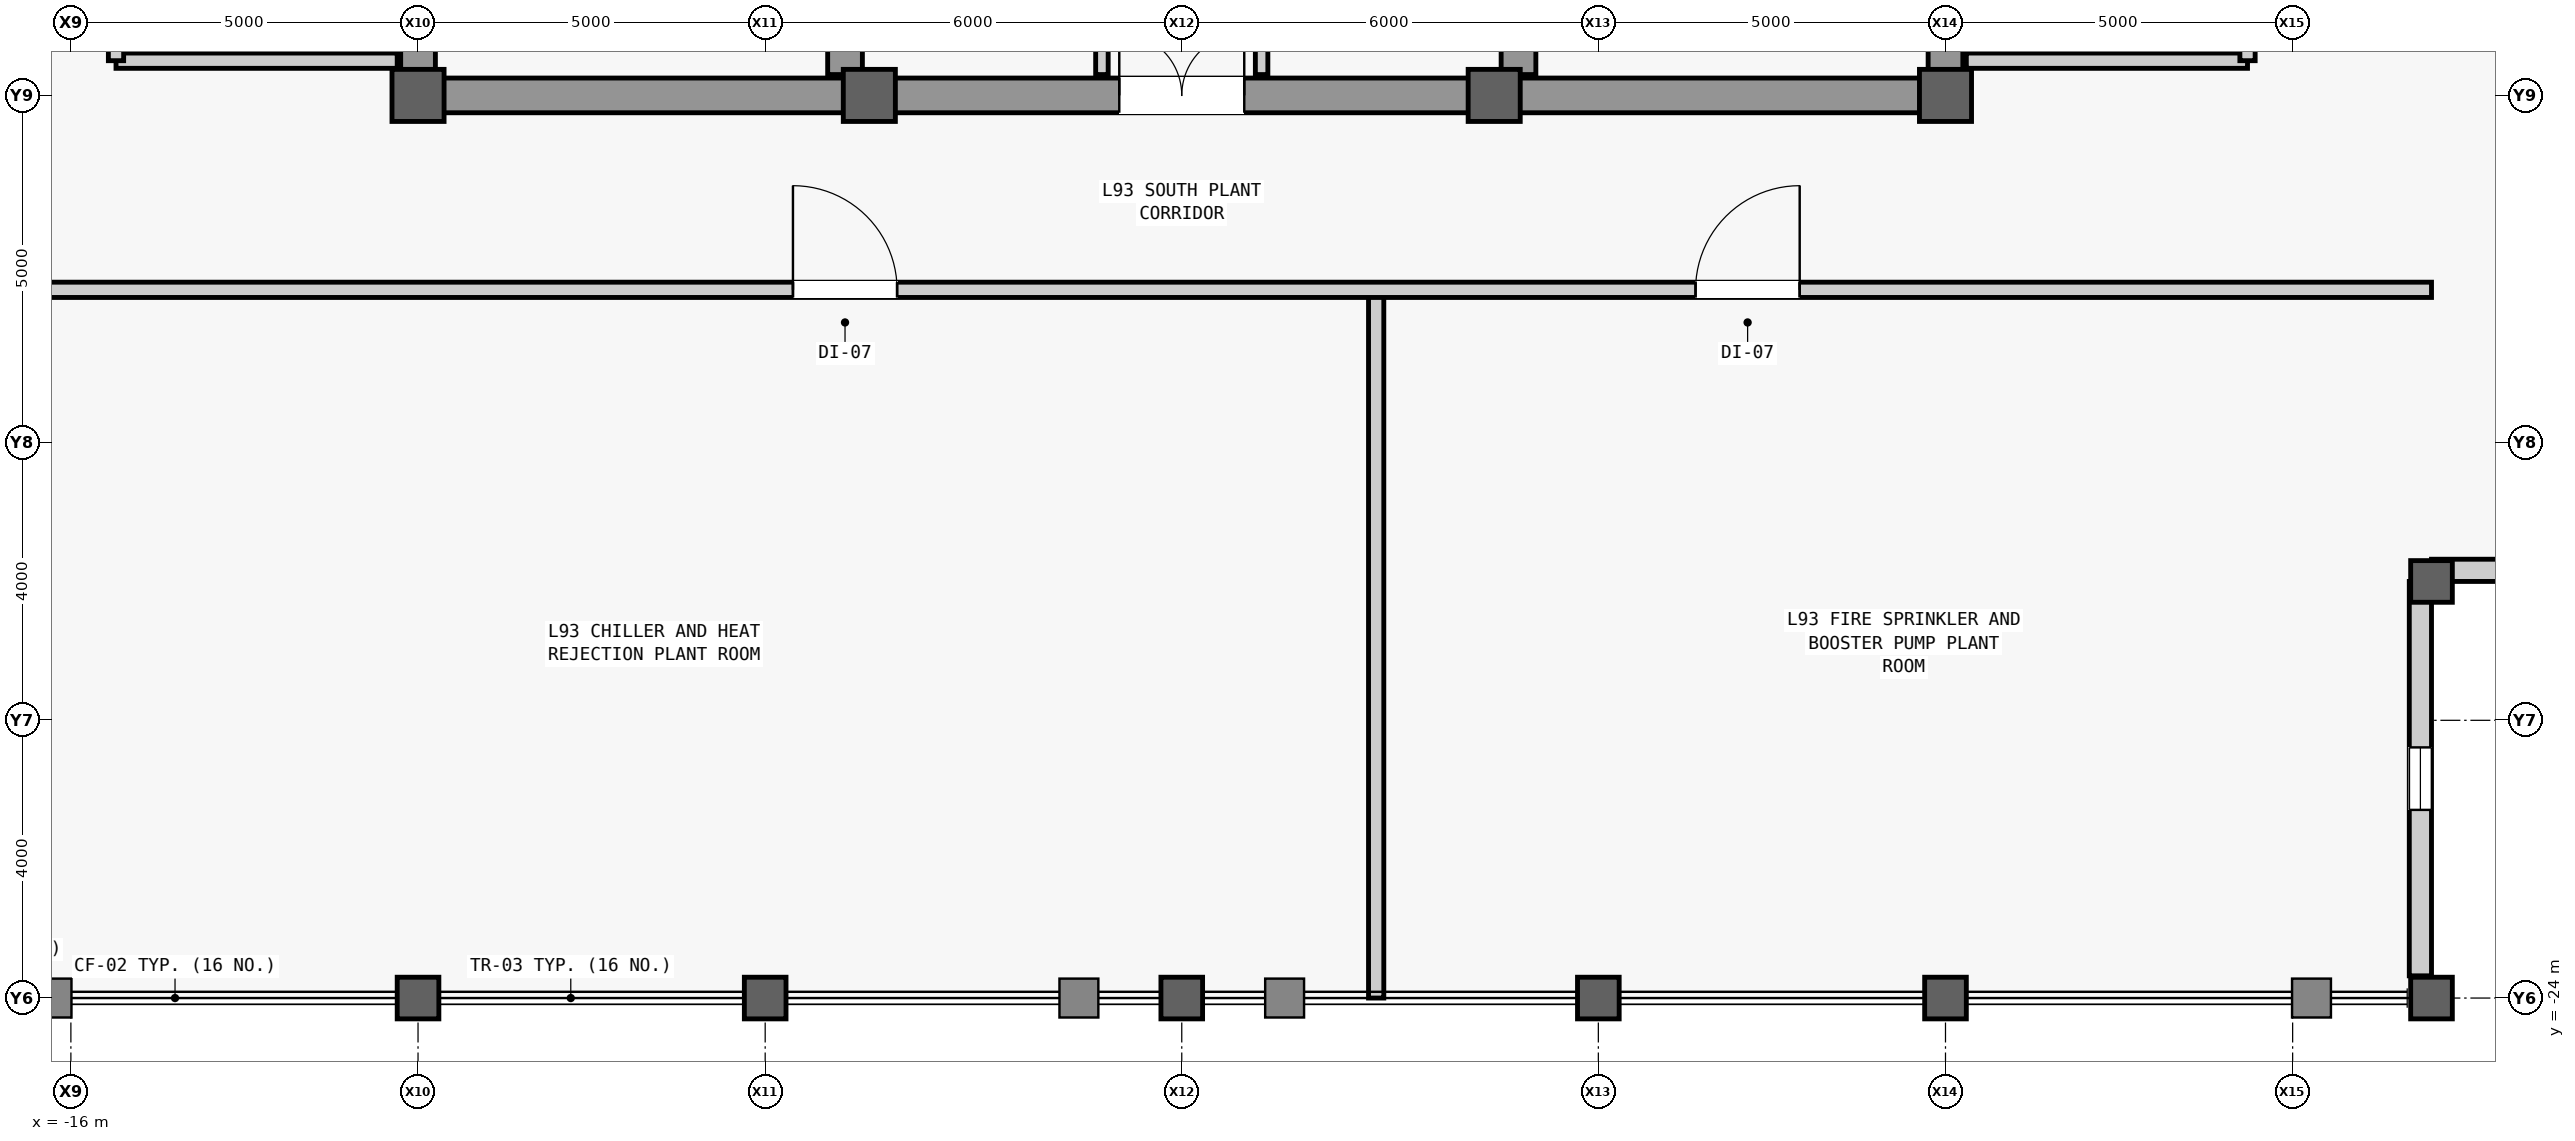
"""IFC4 building model, lengths in metres.
Left out: names, types, materials, properties, quantities, classifications, styles, units other than length and angle.
Written with IfcOpenShell. Run it as: python <this file> out.ifc"""

import sys

from ifc_helpers import new_model, si_unit, direction, frame, frame_2d, origin, origin_2d, place, context, subcontext, project, spatial, rectangle, hollow_rectangle, extrude, source, transform, mapped, element, fill, save


model = new_model("IFC4")
c1 = context("Model", 3, precision=1e-05, world=origin(), true_north=direction((0.0, 1.0)))
c2 = subcontext(c1, "Body", "Model", "MODEL_VIEW")
j1 = project(units=[si_unit("LENGTHUNIT", "METRE"), si_unit("PLANEANGLEUNIT", "RADIAN")], contexts=[c1])
p1 = place(None, origin())
s1 = spatial("IfcSite", under=j1, at=p1, CompositionType="ELEMENT")
p2 = place(p1, origin())
s2 = spatial("IfcBuilding", under=s1, at=p2, CompositionType="ELEMENT")
p3 = place(p2, frame((0.0, 0.0, 394.7)))
s3 = spatial("IfcBuildingStorey", under=s2, at=p3, CompositionType="ELEMENT", Elevation=394.7)
m1 = source(origin(), c2, "Body", "SweptSolid", [
    extrude(rectangle(XDim=22.0, YDim=0.5, at=frame_2d((11.0, 0.0))), origin(), (0.0, 0.0, 1.0), 4.45),
])
p4 = place(p3, frame((-11.0, -11.0, 0.0), z_axis=(0.0, 0.0, 1.0), x_axis=(0.0, 1.0, 0.0)))
e1 = element("IfcWall", 1, at=p4, inside=s3, PredefinedType="SHEAR", context=c2, shape_type="MappedRepresentation", body=[
    mapped(m1, transform((0.0, 0.0, 0.0), scale=1.0)),
])
m2 = source(origin(), c2, "Body", "SweptSolid", [
    extrude(rectangle(XDim=1.1, YDim=2.2, at=frame_2d((0.55, 1.1))), frame((0.0, 0.26, 0.0), z_axis=(0.0, -1.0, 0.0), x_axis=(1.0, 0.0, 0.0)), (0.0, 0.0, 1.0), 0.52),
])
p5 = place(p4, frame((0.8, 0.0, 0.0)))
e2 = element("IfcOpeningElement", 2, at=p5, cuts=e1, PredefinedType="OPENING", context=c2, shape_type="MappedRepresentation", body=[
    mapped(m2, transform((0.0, 0.0, 0.0), scale=1.0)),
])
p6 = place(p4, frame((12.5, 0.0, 0.0)))
e3 = element("IfcOpeningElement", 3, at=p6, cuts=e1, PredefinedType="OPENING", context=c2, shape_type="MappedRepresentation", body=[
    mapped(m2, transform((0.0, 0.0, 0.0), scale=1.0)),
])
m3 = source(origin(), c2, "Body", "SweptSolid", [
    extrude(rectangle(XDim=0.9, YDim=2.15, at=frame_2d((0.45, 1.075))), frame((0.0, 0.26, 0.0), z_axis=(0.0, -1.0, 0.0), x_axis=(1.0, 0.0, 0.0)), (0.0, 0.0, 1.0), 0.52),
])
p7 = place(p4, frame((7.575, 0.0, 0.0)))
e4 = element("IfcOpeningElement", 4, at=p7, cuts=e1, PredefinedType="OPENING", context=c2, shape_type="MappedRepresentation", body=[
    mapped(m3, transform((0.0, 0.0, 0.0), scale=1.0)),
])
m4 = source(origin(), c2, "Body", "SweptSolid", [
    extrude(rectangle(XDim=1.3, YDim=2.3, at=frame_2d((0.65, 1.15))), frame((0.0, 0.26, 0.0), z_axis=(0.0, -1.0, 0.0), x_axis=(1.0, 0.0, 0.0)), (0.0, 0.0, 1.0), 0.52),
])
p8 = place(p4, frame((2.7, 0.0, 0.0)))
e5 = element("IfcOpeningElement", 5, at=p8, cuts=e1, PredefinedType="OPENING", context=c2, shape_type="MappedRepresentation", body=[
    mapped(m4, transform((0.0, 0.0, 0.0), scale=1.0)),
])
p9 = place(p3, frame((11.0, -11.0, 0.0), z_axis=(0.0, 0.0, 1.0), x_axis=(0.0, 1.0, 0.0)))
e6 = element("IfcWall", 6, at=p9, inside=s3, PredefinedType="SHEAR", context=c2, shape_type="MappedRepresentation", body=[
    mapped(m1, transform((0.0, 0.0, 0.0), scale=1.0)),
])
p10 = place(p9, frame((0.8, 0.0, 0.0)))
e7 = element("IfcOpeningElement", 7, at=p10, cuts=e6, PredefinedType="OPENING", context=c2, shape_type="MappedRepresentation", body=[
    mapped(m2, transform((0.0, 0.0, 0.0), scale=1.0)),
])
p11 = place(p9, frame((7.575, 0.0, 0.0)))
e8 = element("IfcOpeningElement", 8, at=p11, cuts=e6, PredefinedType="OPENING", context=c2, shape_type="MappedRepresentation", body=[
    mapped(m3, transform((0.0, 0.0, 0.0), scale=1.0)),
])
p12 = place(p9, frame((2.7, 0.0, 0.0)))
e9 = element("IfcOpeningElement", 9, at=p12, cuts=e6, PredefinedType="OPENING", context=c2, shape_type="MappedRepresentation", body=[
    mapped(m4, transform((0.0, 0.0, 0.0), scale=1.0)),
])
p13 = place(p9, frame((13.35, 0.0, 0.0)))
e10 = element("IfcOpeningElement", 10, at=p13, cuts=e6, PredefinedType="OPENING", context=c2, shape_type="MappedRepresentation", body=[
    mapped(m4, transform((0.0, 0.0, 0.0), scale=1.0)),
])
m5 = source(origin(), c2, "Body", "SweptSolid", [
    extrude(rectangle(XDim=21.4, YDim=0.5, at=frame_2d((10.7, 0.0))), origin(), (0.0, 0.0, 1.0), 4.45),
])
for number, where, z_axis, x_axis in (
    (11, (-4.85, -10.7, 0.0), (0.0, 0.0, 1.0), (0.0, 1.0, 0.0)),
    (12, (4.85, -10.7, 0.0), (0.0, 0.0, 1.0), (0.0, 1.0, 0.0)),
):
    element("IfcWall", number, at=place(p3, frame(where, z_axis=z_axis, x_axis=x_axis)), inside=s3, PredefinedType="SHEAR", context=c2, shape_type="MappedRepresentation", body=[
        mapped(m5, transform((0.0, 0.0, 0.0), scale=1.0)),
    ])
m6 = source(origin(), c2, "Body", "SweptSolid", [
    extrude(rectangle(XDim=5.9, YDim=0.5, at=frame_2d((2.95, 0.0))), origin(), (0.0, 0.0, 1.0), 4.45),
])
for number, where, z_axis, x_axis in (
    (13, (-10.75, -11.0, 0.0), (0.0, 0.0, 1.0), (1.0, 0.0, 0.0)),
    (14, (4.85, -11.0, 0.0), (0.0, 0.0, 1.0), (1.0, 0.0, 0.0)),
):
    element("IfcWall", number, at=place(p3, frame(where, z_axis=z_axis, x_axis=x_axis)), inside=s3, PredefinedType="SHEAR", context=c2, shape_type="MappedRepresentation", body=[
        mapped(m6, transform((0.0, 0.0, 0.0), scale=1.0)),
    ])
m7 = source(origin(), c2, "Body", "SweptSolid", [
    extrude(rectangle(XDim=9.2, YDim=0.5, at=frame_2d((4.6, 0.0))), origin(), (0.0, 0.0, 1.0), 4.45),
])
p14 = place(p3, frame((-4.6, -11.0, 0.0), z_axis=(0.0, 0.0, 1.0), x_axis=(1.0, 0.0, 0.0)))
e15 = element("IfcWall", 15, at=p14, inside=s3, PredefinedType="SHEAR", context=c2, shape_type="MappedRepresentation", body=[
    mapped(m7, transform((0.0, 0.0, 0.0), scale=1.0)),
])
m8 = source(origin(), c2, "Body", "SweptSolid", [
    extrude(rectangle(XDim=1.8, YDim=2.25, at=frame_2d((0.9, 1.125))), frame((0.0, 0.26, 0.0), z_axis=(0.0, -1.0, 0.0), x_axis=(1.0, 0.0, 0.0)), (0.0, 0.0, 1.0), 0.52),
])
p15 = place(p14, frame((3.7, 0.0, 0.0)))
e16 = element("IfcOpeningElement", 16, at=p15, cuts=e15, PredefinedType="OPENING", context=c2, shape_type="MappedRepresentation", body=[
    mapped(m8, transform((0.0, 0.0, 0.0), scale=1.0)),
])
m9 = source(origin(), c2, "Body", "SweptSolid", [
    extrude(hollow_rectangle(XDim=0.6, YDim=0.6, WallThickness=0.035, at=origin_2d()), origin(), (0.0, 0.0, 1.0), 4.8),
])
p16 = place(p3, frame((-11.0, -24.0, 0.0), z_axis=(0.0, 0.0, 1.0), x_axis=(1.0, 0.0, 0.0)))
e17 = element("IfcColumn", 17, at=p16, inside=s3, PredefinedType="COLUMN", context=c2, shape_type="MappedRepresentation", body=[
    mapped(m9, transform((0.0, 0.0, 0.0), scale=1.0)),
])
m10 = source(origin(), c2, "Body", "SweptSolid", [
    extrude(rectangle(XDim=0.75, YDim=0.75, at=origin_2d()), origin(), (0.0, 0.0, 1.0), 4.8),
])
p17 = place(p3, frame((-11.0, -11.0, 0.0), z_axis=(0.0, 0.0, 1.0), x_axis=(1.0, 0.0, 0.0)))
e18 = element("IfcColumn", 18, at=p17, inside=s3, PredefinedType="COLUMN", context=c2, shape_type="MappedRepresentation", body=[
    mapped(m10, transform((0.0, 0.0, 0.0), scale=1.0)),
])
p18 = place(p3, frame((-6.0, -24.0, 0.0), z_axis=(0.0, 0.0, 1.0), x_axis=(1.0, 0.0, 0.0)))
e19 = element("IfcColumn", 19, at=p18, inside=s3, PredefinedType="COLUMN", context=c2, shape_type="MappedRepresentation", body=[
    mapped(m9, transform((0.0, 0.0, 0.0), scale=1.0)),
])
p19 = place(p3, frame((-4.5, -11.0, 0.0), z_axis=(0.0, 0.0, 1.0), x_axis=(1.0, 0.0, 0.0)))
e20 = element("IfcColumn", 20, at=p19, inside=s3, PredefinedType="COLUMN", context=c2, shape_type="MappedRepresentation", body=[
    mapped(m10, transform((0.0, 0.0, 0.0), scale=1.0)),
])
p20 = place(p3, frame((0.0, -24.0, 0.0), z_axis=(0.0, 0.0, 1.0), x_axis=(1.0, 0.0, 0.0)))
e21 = element("IfcColumn", 21, at=p20, inside=s3, PredefinedType="COLUMN", context=c2, shape_type="MappedRepresentation", body=[
    mapped(m9, transform((0.0, 0.0, 0.0), scale=1.0)),
])
p21 = place(p3, frame((4.5, -11.0, 0.0), z_axis=(0.0, 0.0, 1.0), x_axis=(1.0, 0.0, 0.0)))
e22 = element("IfcColumn", 22, at=p21, inside=s3, PredefinedType="COLUMN", context=c2, shape_type="MappedRepresentation", body=[
    mapped(m10, transform((0.0, 0.0, 0.0), scale=1.0)),
])
for number, where, z_axis, x_axis in (
    (23, (6.0, -24.0, 0.0), (0.0, 0.0, 1.0), (1.0, 0.0, 0.0)),
    (24, (11.0, -24.0, 0.0), (0.0, 0.0, 1.0), (1.0, 0.0, 0.0)),
):
    element("IfcColumn", number, at=place(p3, frame(where, z_axis=z_axis, x_axis=x_axis)), inside=s3, PredefinedType="COLUMN", context=c2, shape_type="MappedRepresentation", body=[
        mapped(m9, transform((0.0, 0.0, 0.0), scale=1.0)),
    ])
p22 = place(p3, frame((11.0, -11.0, 0.0), z_axis=(0.0, 0.0, 1.0), x_axis=(1.0, 0.0, 0.0)))
e25 = element("IfcColumn", 25, at=p22, inside=s3, PredefinedType="COLUMN", context=c2, shape_type="MappedRepresentation", body=[
    mapped(m10, transform((0.0, 0.0, 0.0), scale=1.0)),
])
for number, where, z_axis, x_axis in (
    (26, (18.0, -24.0, 0.0), (0.0, 0.0, 1.0), (1.0, 0.0, 0.0)),
    (27, (18.0, -18.0, 0.0), (0.0, 0.0, 1.0), (1.0, 0.0, 0.0)),
):
    element("IfcColumn", number, at=place(p3, frame(where, z_axis=z_axis, x_axis=x_axis)), inside=s3, PredefinedType="COLUMN", context=c2, shape_type="MappedRepresentation", body=[
        mapped(m9, transform((0.0, 0.0, 0.0), scale=1.0)),
    ])
m11 = source(origin(), c2, "Body", "SweptSolid", [
    extrude(rectangle(XDim=5.68, YDim=0.32, at=frame_2d((2.84, 0.0))), origin(), (0.0, 0.0, 1.0), 3.901),
])
p23 = place(p3, frame((17.84, -23.68, 0.0), z_axis=(0.0, 0.0, 1.0), x_axis=(0.0, 1.0, 0.0)))
e28 = element("IfcWall", 28, at=p23, inside=s3, PredefinedType="STANDARD", context=c2, shape_type="MappedRepresentation", body=[
    mapped(m11, transform((0.0, 0.0, 0.0), scale=1.0)),
])
m12 = source(origin(), c2, "Body", "SweptSolid", [
    extrude(rectangle(XDim=0.9, YDim=2.4, at=frame_2d((0.45, 1.2))), frame((0.0, 0.17, 0.0), z_axis=(0.0, -1.0, 0.0), x_axis=(1.0, 0.0, 0.0)), (0.0, 0.0, 1.0), 0.34),
])
p24 = place(p23, frame((2.39, 0.0, 0.7)))
e29 = element("IfcOpeningElement", 29, at=p24, cuts=e28, PredefinedType="OPENING", context=c2, shape_type="MappedRepresentation", body=[
    mapped(m12, transform((0.0, 0.0, 0.0), scale=1.0)),
])
p25 = place(p3, frame((18.0, -17.84, 0.0), z_axis=(0.0, 0.0, 1.0), x_axis=(1.0, 0.0, 0.0)))
e30 = element("IfcWall", 30, at=p25, inside=s3, PredefinedType="STANDARD", context=c2, shape_type="MappedRepresentation", body=[
    mapped(m11, transform((0.0, 0.0, 0.0), scale=1.0)),
])
p26 = place(p25, frame((2.39, 0.0, 0.7)))
e31 = element("IfcOpeningElement", 31, at=p26, cuts=e30, PredefinedType="OPENING", context=c2, shape_type="MappedRepresentation", body=[
    mapped(m12, transform((0.0, 0.0, 0.0), scale=1.0)),
])
m13 = source(origin(), c2, "Body", "SweptSolid", [
    extrude(rectangle(XDim=4.05, YDim=0.22, at=frame_2d((2.025, 0.0))), origin(), (0.0, 0.0, 1.0), 4.45),
])
p27 = place(p3, frame((-15.35, -10.5, 0.0), z_axis=(0.0, 0.0, 1.0), x_axis=(1.0, 0.0, 0.0)))
e32 = element("IfcWall", 32, at=p27, inside=s3, PredefinedType="PARTITIONING", context=c2, shape_type="MappedRepresentation", body=[
    mapped(m13, transform((0.0, 0.0, 0.0), scale=1.0)),
])
m14 = source(origin(), c2, "Body", "SweptSolid", [
    extrude(rectangle(XDim=4.4, YDim=0.22, at=frame_2d((2.2, 0.0))), origin(), (0.0, 0.0, 1.0), 4.45),
])
p28 = place(p3, frame((-15.35, -10.5, 0.0), z_axis=(0.0, 0.0, 1.0), x_axis=(0.0, 1.0, 0.0)))
e33 = element("IfcWall", 33, at=p28, inside=s3, PredefinedType="PARTITIONING", context=c2, shape_type="MappedRepresentation", body=[
    mapped(m14, transform((0.0, 0.0, 0.0), scale=1.0)),
])
m15 = source(origin(), c2, "Body", "SweptSolid", [
    extrude(rectangle(XDim=1.2, YDim=2.2, at=frame_2d((0.6, 1.1))), frame((0.0, 0.12, 0.0), z_axis=(0.0, -1.0, 0.0), x_axis=(1.0, 0.0, 0.0)), (0.0, 0.0, 1.0), 0.24),
])
p29 = place(p28, frame((1.6, 0.0, 0.0)))
e34 = element("IfcOpeningElement", 34, at=p29, cuts=e33, PredefinedType="OPENING", context=c2, shape_type="MappedRepresentation", body=[
    mapped(m15, transform((0.0, 0.0, 0.0), scale=1.0)),
])
p30 = place(p3, frame((11.3, -10.5, 0.0), z_axis=(0.0, 0.0, 1.0), x_axis=(1.0, 0.0, 0.0)))
e35 = element("IfcWall", 35, at=p30, inside=s3, PredefinedType="PARTITIONING", context=c2, shape_type="MappedRepresentation", body=[
    mapped(m13, transform((0.0, 0.0, 0.0), scale=1.0)),
])
p31 = place(p3, frame((15.35, -10.5, 0.0), z_axis=(0.0, 0.0, 1.0), x_axis=(0.0, 1.0, 0.0)))
e36 = element("IfcWall", 36, at=p31, inside=s3, PredefinedType="PARTITIONING", context=c2, shape_type="MappedRepresentation", body=[
    mapped(m14, transform((0.0, 0.0, 0.0), scale=1.0)),
])
p32 = place(p31, frame((1.6, 0.0, 0.0)))
e37 = element("IfcOpeningElement", 37, at=p32, cuts=e36, PredefinedType="OPENING", context=c2, shape_type="MappedRepresentation", body=[
    mapped(m15, transform((0.0, 0.0, 0.0), scale=1.0)),
])
m16 = source(origin(), c2, "Body", "SweptSolid", [
    extrude(rectangle(XDim=5.4, YDim=0.18, at=frame_2d((2.7, 0.0))), origin(), (0.0, 0.0, 1.0), 4.45),
])
p33 = place(p3, frame((-1.15, -10.7, 0.0), z_axis=(0.0, 0.0, 1.0), x_axis=(0.0, 1.0, 0.0)))
e38 = element("IfcWall", 38, at=p33, inside=s3, PredefinedType="PARTITIONING", context=c2, shape_type="MappedRepresentation", body=[
    mapped(m16, transform((0.0, 0.0, 0.0), scale=1.0)),
])
m17 = source(origin(), c2, "Body", "SweptSolid", [
    extrude(rectangle(XDim=0.9, YDim=2.15, at=frame_2d((0.45, 1.075))), frame((0.0, 0.1, 0.0), z_axis=(0.0, -1.0, 0.0), x_axis=(1.0, 0.0, 0.0)), (0.0, 0.0, 1.0), 0.2),
])
p34 = place(p33, frame((1.15, 0.0, 0.0)))
e39 = element("IfcOpeningElement", 39, at=p34, cuts=e38, PredefinedType="OPENING", context=c2, shape_type="MappedRepresentation", body=[
    mapped(m17, transform((0.0, 0.0, 0.0), scale=1.0)),
])
p35 = place(p33, frame((3.85, 0.0, 0.0)))
e40 = element("IfcOpeningElement", 40, at=p35, cuts=e38, PredefinedType="OPENING", context=c2, shape_type="MappedRepresentation", body=[
    mapped(m17, transform((0.0, 0.0, 0.0), scale=1.0)),
])
p36 = place(p3, frame((1.15, -10.7, 0.0), z_axis=(0.0, 0.0, 1.0), x_axis=(0.0, 1.0, 0.0)))
e41 = element("IfcWall", 41, at=p36, inside=s3, PredefinedType="PARTITIONING", context=c2, shape_type="MappedRepresentation", body=[
    mapped(m16, transform((0.0, 0.0, 0.0), scale=1.0)),
])
p37 = place(p36, frame((2.25, 0.0, 0.0)))
e42 = element("IfcOpeningElement", 42, at=p37, cuts=e41, PredefinedType="OPENING", context=c2, shape_type="MappedRepresentation", body=[
    mapped(m17, transform((0.0, 0.0, 0.0), scale=1.0)),
])
m18 = source(origin(), c2, "Body", "SweptSolid", [
    extrude(rectangle(XDim=10.2, YDim=0.22, at=frame_2d((5.1, 0.0))), origin(), (0.0, 0.0, 1.0), 4.45),
])
p38 = place(p3, frame((2.8, -24.0, 0.0), z_axis=(0.0, 0.0, 1.0), x_axis=(0.0, 1.0, 0.0)))
e43 = element("IfcWall", 43, at=p38, inside=s3, PredefinedType="PARTITIONING", context=c2, shape_type="MappedRepresentation", body=[
    mapped(m18, transform((0.0, 0.0, 0.0), scale=1.0)),
])
m19 = source(origin(), c2, "Body", "SweptSolid", [
    extrude(rectangle(XDim=36.0, YDim=0.22, at=frame_2d((18.0, 0.0))), origin(), (0.0, 0.0, 1.0), 4.45),
])
p39 = place(p3, frame((-18.0, -13.8, 0.0), z_axis=(0.0, 0.0, 1.0), x_axis=(1.0, 0.0, 0.0)))
e44 = element("IfcWall", 44, at=p39, inside=s3, PredefinedType="PARTITIONING", context=c2, shape_type="MappedRepresentation", body=[
    mapped(m19, transform((0.0, 0.0, 0.0), scale=1.0)),
])
m20 = source(origin(), c2, "Body", "SweptSolid", [
    extrude(rectangle(XDim=1.5, YDim=2.3, at=frame_2d((0.75, 1.15))), frame((0.0, 0.12, 0.0), z_axis=(0.0, -1.0, 0.0), x_axis=(1.0, 0.0, 0.0)), (0.0, 0.0, 1.0), 0.24),
])
p40 = place(p39, frame((12.4, 0.0, 0.0)))
e45 = element("IfcOpeningElement", 45, at=p40, cuts=e44, PredefinedType="OPENING", context=c2, shape_type="MappedRepresentation", body=[
    mapped(m20, transform((0.0, 0.0, 0.0), scale=1.0)),
])
p41 = place(p39, frame((25.4, 0.0, 0.0)))
e46 = element("IfcOpeningElement", 46, at=p41, cuts=e44, PredefinedType="OPENING", context=c2, shape_type="MappedRepresentation", body=[
    mapped(m20, transform((0.0, 0.0, 0.0), scale=1.0)),
])
m21 = source(origin(), c2, "Body", "SweptSolid", [
    extrude(rectangle(XDim=0.9, YDim=2.4, at=frame_2d((0.45, 1.2))), frame((0.0, 0.03, 0.0), z_axis=(0.0, -1.0, 0.0), x_axis=(1.0, 0.0, 0.0)), (0.0, 0.0, 1.0), 0.06),
])
p42 = place(p24, origin())
e47 = element("IfcWindow", 47, at=p42, inside=s3, PartitioningType="SINGLE_PANEL", PredefinedType="WINDOW", context=c2, shape_type="MappedRepresentation", body=[
    mapped(m21, transform((0.0, 0.0, 0.0), scale=1.0)),
])
fill(e29, e47)
m22 = source(origin(), c2, "Body", "SweptSolid", [
    extrude(rectangle(XDim=1.8, YDim=2.25, at=frame_2d((0.9, 1.125))), frame((0.0, 0.025, 0.0), z_axis=(0.0, -1.0, 0.0), x_axis=(1.0, 0.0, 0.0)), (0.0, 0.0, 1.0), 0.05),
])
p43 = place(p15, origin())
e48 = element("IfcDoor", 48, at=p43, inside=s3, OperationType="SINGLE_SWING_LEFT", PredefinedType="DOOR", context=c2, shape_type="MappedRepresentation", body=[
    mapped(m22, transform((0.0, 0.0, 0.0), scale=1.0)),
])
fill(e16, e48)
m23 = source(origin(), c2, "Body", "SweptSolid", [
    extrude(rectangle(XDim=1.5, YDim=2.3, at=frame_2d((0.75, 1.15))), frame((0.0, 0.025, 0.0), z_axis=(0.0, -1.0, 0.0), x_axis=(1.0, 0.0, 0.0)), (0.0, 0.0, 1.0), 0.05),
])
p44 = place(p40, origin())
e49 = element("IfcDoor", 49, at=p44, inside=s3, OperationType="SINGLE_SWING_LEFT", PredefinedType="DOOR", context=c2, shape_type="MappedRepresentation", body=[
    mapped(m23, transform((0.0, 0.0, 0.0), scale=1.0)),
])
fill(e45, e49)
p45 = place(p41, origin())
e50 = element("IfcDoor", 50, at=p45, inside=s3, OperationType="SINGLE_SWING_RIGHT", PredefinedType="DOOR", context=c2, shape_type="MappedRepresentation", body=[
    mapped(m23, transform((0.0, 0.0, 0.0), scale=1.0)),
])
fill(e46, e50)
save(model, sys.argv[1])
